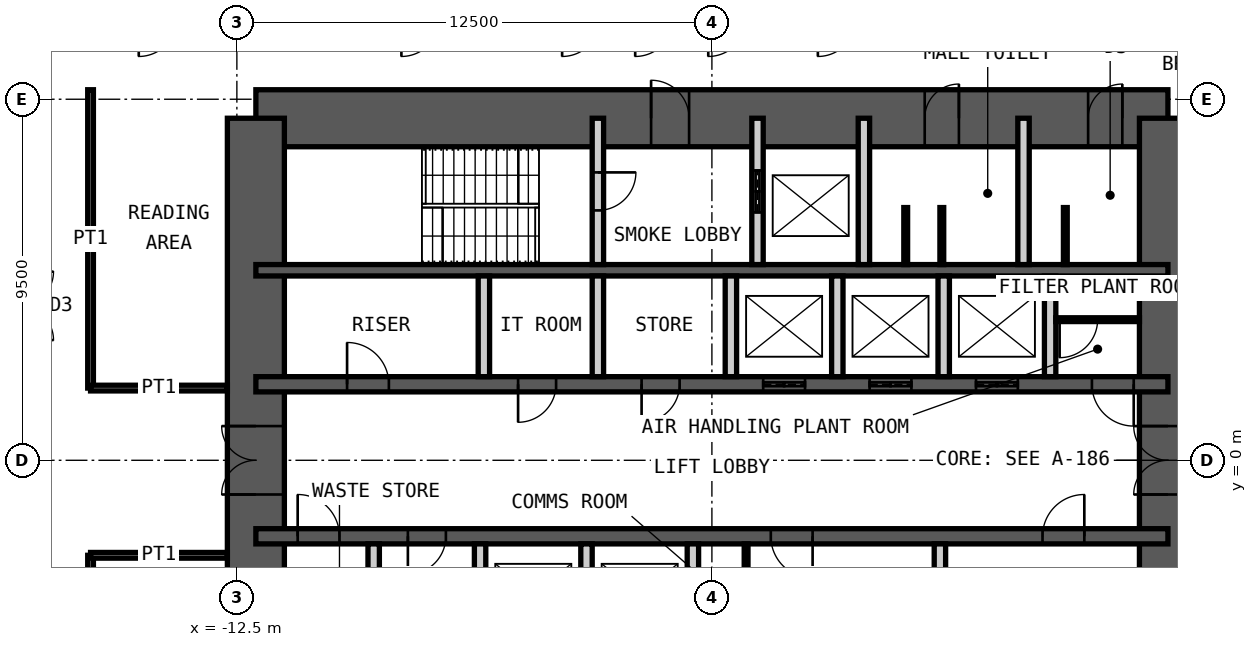
"""IFC4 building model, lengths in metres.
Left out: names, types, materials, properties, quantities, classifications, styles, units other than length and angle.
Written with IfcOpenShell. Run it as: python <this file> out.ifc"""

import sys

from ifc_helpers import new_model, si_unit, direction, frame, frame_2d, origin, place, context, subcontext, project, spatial, rectangle, extrude, element, fill, save


model = new_model("IFC4")
c1 = context("Model", 3, precision=1e-05, world=origin(), true_north=direction((0.0, 1.0)))
c2 = subcontext(c1, "Body", "Model", "MODEL_VIEW")
j1 = project(units=[si_unit("LENGTHUNIT", "METRE"), si_unit("PLANEANGLEUNIT", "RADIAN")], contexts=[c1])
p1 = place(None, origin())
s1 = spatial("IfcSite", under=j1, at=p1, CompositionType="ELEMENT")
p2 = place(p1, origin())
s2 = spatial("IfcBuilding", under=s1, at=p2, CompositionType="ELEMENT")
p3 = place(p2, frame((0.0, 0.0, 136.6)))
s3 = spatial("IfcBuildingStorey", under=s2, at=p3, CompositionType="ELEMENT", Elevation=136.6)
p4 = place(p3, frame((-12.0, 9.0, 0.0), z_axis=(0.0, 0.0, 1.0), x_axis=(1.0, 0.0, 0.0)))
e1 = element("IfcWall", 1, at=p4, inside=s3, PredefinedType="SHEAR", context=c2, shape_type="SweptSolid", body=[
    extrude(rectangle(XDim=24.0, YDim=1.5, at=frame_2d((12.0, 0.0))), origin(), (0.0, 0.0, 1.0), 4.2),
])
p5 = place(p4, frame((10.4, 0.0, 0.0)))
e2 = element("IfcOpeningElement", 2, at=p5, cuts=e1, PredefinedType="OPENING", context=c2, shape_type="SweptSolid", body=[
    extrude(rectangle(XDim=1.0, YDim=2.1, at=frame_2d((0.5, 1.05))), frame((0.0, 0.76, 0.0), z_axis=(0.0, -1.0, 0.0), x_axis=(1.0, 0.0, 0.0)), (0.0, 0.0, 1.0), 1.52),
])
p6 = place(p4, frame((17.6, 0.0, 0.0)))
e3 = element("IfcOpeningElement", 3, at=p6, cuts=e1, PredefinedType="OPENING", context=c2, shape_type="SweptSolid", body=[
    extrude(rectangle(XDim=0.9, YDim=2.1, at=frame_2d((0.45, 1.05))), frame((0.0, 0.76, 0.0), z_axis=(0.0, -1.0, 0.0), x_axis=(1.0, 0.0, 0.0)), (0.0, 0.0, 1.0), 1.52),
])
p7 = place(p4, frame((21.9, 0.0, 0.0)))
e4 = element("IfcOpeningElement", 4, at=p7, cuts=e1, PredefinedType="OPENING", context=c2, shape_type="SweptSolid", body=[
    extrude(rectangle(XDim=0.9, YDim=2.1, at=frame_2d((0.45, 1.05))), frame((0.0, 0.76, 0.0), z_axis=(0.0, -1.0, 0.0), x_axis=(1.0, 0.0, 0.0)), (0.0, 0.0, 1.0), 1.52),
])
p8 = place(p3, frame((12.0, -9.0, 0.0), z_axis=(0.0, 0.0, 1.0), x_axis=(0.0, 1.0, 0.0)))
e5 = element("IfcWall", 5, at=p8, inside=s3, PredefinedType="SHEAR", context=c2, shape_type="SweptSolid", body=[
    extrude(rectangle(XDim=18.0, YDim=1.5, at=frame_2d((9.0, 0.0))), origin(), (0.0, 0.0, 1.0), 4.2),
])
p9 = place(p8, frame((8.1, 0.0, 0.0)))
e6 = element("IfcOpeningElement", 6, at=p9, cuts=e5, PredefinedType="OPENING", context=c2, shape_type="SweptSolid", body=[
    extrude(rectangle(XDim=1.8, YDim=2.1, at=frame_2d((0.9, 1.05))), frame((0.0, 0.76, 0.0), z_axis=(0.0, -1.0, 0.0), x_axis=(1.0, 0.0, 0.0)), (0.0, 0.0, 1.0), 1.52),
])
p10 = place(p3, frame((-12.0, -9.0, 0.0), z_axis=(0.0, 0.0, 1.0), x_axis=(0.0, 1.0, 0.0)))
e7 = element("IfcWall", 7, at=p10, inside=s3, PredefinedType="SHEAR", context=c2, shape_type="SweptSolid", body=[
    extrude(rectangle(XDim=18.0, YDim=1.5, at=frame_2d((9.0, 0.0))), origin(), (0.0, 0.0, 1.0), 4.2),
])
p11 = place(p10, frame((8.1, 0.0, 0.0)))
e8 = element("IfcOpeningElement", 8, at=p11, cuts=e7, PredefinedType="OPENING", context=c2, shape_type="SweptSolid", body=[
    extrude(rectangle(XDim=1.8, YDim=2.1, at=frame_2d((0.9, 1.05))), frame((0.0, 0.76, 0.0), z_axis=(0.0, -1.0, 0.0), x_axis=(1.0, 0.0, 0.0)), (0.0, 0.0, 1.0), 1.52),
])
p12 = place(p3, frame((-12.0, 5.0, 0.0), z_axis=(0.0, 0.0, 1.0), x_axis=(1.0, 0.0, 0.0)))
e9 = element("IfcWall", 9, at=p12, inside=s3, PredefinedType="SHEAR", context=c2, shape_type="SweptSolid", body=[
    extrude(rectangle(XDim=24.0, YDim=0.3, at=frame_2d((12.0, 0.0))), origin(), (0.0, 0.0, 1.0), 4.2),
])
p13 = place(p3, frame((-12.0, 2.0, 0.0), z_axis=(0.0, 0.0, 1.0), x_axis=(1.0, 0.0, 0.0)))
e10 = element("IfcWall", 10, at=p13, inside=s3, PredefinedType="SHEAR", context=c2, shape_type="SweptSolid", body=[
    extrude(rectangle(XDim=24.0, YDim=0.4, at=frame_2d((12.0, 0.0))), origin(), (0.0, 0.0, 1.0), 4.2),
])
p14 = place(p13, frame((2.4, 0.0, 0.0)))
e11 = element("IfcOpeningElement", 11, at=p14, cuts=e10, PredefinedType="OPENING", context=c2, shape_type="SweptSolid", body=[
    extrude(rectangle(XDim=1.1, YDim=2.1, at=frame_2d((0.55, 1.05))), frame((0.0, 0.21, 0.0), z_axis=(0.0, -1.0, 0.0), x_axis=(1.0, 0.0, 0.0)), (0.0, 0.0, 1.0), 0.42),
])
p15 = place(p13, frame((22.0, 0.0, 0.0)))
e12 = element("IfcOpeningElement", 12, at=p15, cuts=e10, PredefinedType="OPENING", context=c2, shape_type="SweptSolid", body=[
    extrude(rectangle(XDim=1.1, YDim=2.1, at=frame_2d((0.55, 1.05))), frame((0.0, 0.21, 0.0), z_axis=(0.0, -1.0, 0.0), x_axis=(1.0, 0.0, 0.0)), (0.0, 0.0, 1.0), 0.42),
])
p16 = place(p13, frame((10.15, 0.0, 0.0)))
e13 = element("IfcOpeningElement", 13, at=p16, cuts=e10, PredefinedType="OPENING", context=c2, shape_type="SweptSolid", body=[
    extrude(rectangle(XDim=1.0, YDim=2.1, at=frame_2d((0.5, 1.05))), frame((0.0, 0.21, 0.0), z_axis=(0.0, -1.0, 0.0), x_axis=(1.0, 0.0, 0.0)), (0.0, 0.0, 1.0), 0.42),
])
p17 = place(p13, frame((6.9, 0.0, 0.0)))
e14 = element("IfcOpeningElement", 14, at=p17, cuts=e10, PredefinedType="OPENING", context=c2, shape_type="SweptSolid", body=[
    extrude(rectangle(XDim=1.0, YDim=2.1, at=frame_2d((0.5, 1.05))), frame((0.0, 0.21, 0.0), z_axis=(0.0, -1.0, 0.0), x_axis=(1.0, 0.0, 0.0)), (0.0, 0.0, 1.0), 0.42),
])
p18 = place(p13, frame((13.35, 0.0, 0.0)))
e15 = element("IfcOpeningElement", 15, at=p18, cuts=e10, PredefinedType="OPENING", context=c2, shape_type="SweptSolid", body=[
    extrude(rectangle(XDim=1.1, YDim=2.4, at=frame_2d((0.55, 1.2))), frame((0.0, 0.21, 0.0), z_axis=(0.0, -1.0, 0.0), x_axis=(1.0, 0.0, 0.0)), (0.0, 0.0, 1.0), 0.42),
])
p19 = place(p13, frame((16.15, 0.0, 0.0)))
e16 = element("IfcOpeningElement", 16, at=p19, cuts=e10, PredefinedType="OPENING", context=c2, shape_type="SweptSolid", body=[
    extrude(rectangle(XDim=1.1, YDim=2.4, at=frame_2d((0.55, 1.2))), frame((0.0, 0.21, 0.0), z_axis=(0.0, -1.0, 0.0), x_axis=(1.0, 0.0, 0.0)), (0.0, 0.0, 1.0), 0.42),
])
p20 = place(p13, frame((18.95, 0.0, 0.0)))
e17 = element("IfcOpeningElement", 17, at=p20, cuts=e10, PredefinedType="OPENING", context=c2, shape_type="SweptSolid", body=[
    extrude(rectangle(XDim=1.1, YDim=2.4, at=frame_2d((0.55, 1.2))), frame((0.0, 0.21, 0.0), z_axis=(0.0, -1.0, 0.0), x_axis=(1.0, 0.0, 0.0)), (0.0, 0.0, 1.0), 0.42),
])
p21 = place(p3, frame((-12.0, -2.0, 0.0), z_axis=(0.0, 0.0, 1.0), x_axis=(1.0, 0.0, 0.0)))
e18 = element("IfcWall", 18, at=p21, inside=s3, PredefinedType="SHEAR", context=c2, shape_type="SweptSolid", body=[
    extrude(rectangle(XDim=24.0, YDim=0.4, at=frame_2d((12.0, 0.0))), origin(), (0.0, 0.0, 1.0), 4.2),
])
p22 = place(p21, frame((1.1, 0.0, 0.0)))
e19 = element("IfcOpeningElement", 19, at=p22, cuts=e18, PredefinedType="OPENING", context=c2, shape_type="SweptSolid", body=[
    extrude(rectangle(XDim=1.1, YDim=2.1, at=frame_2d((0.55, 1.05))), frame((0.0, 0.21, 0.0), z_axis=(0.0, -1.0, 0.0), x_axis=(1.0, 0.0, 0.0)), (0.0, 0.0, 1.0), 0.42),
])
p23 = place(p21, frame((13.55, 0.0, 0.0)))
e20 = element("IfcOpeningElement", 20, at=p23, cuts=e18, PredefinedType="OPENING", context=c2, shape_type="SweptSolid", body=[
    extrude(rectangle(XDim=1.1, YDim=2.1, at=frame_2d((0.55, 1.05))), frame((0.0, 0.21, 0.0), z_axis=(0.0, -1.0, 0.0), x_axis=(1.0, 0.0, 0.0)), (0.0, 0.0, 1.0), 0.42),
])
p24 = place(p21, frame((20.7, 0.0, 0.0)))
e21 = element("IfcOpeningElement", 21, at=p24, cuts=e18, PredefinedType="OPENING", context=c2, shape_type="SweptSolid", body=[
    extrude(rectangle(XDim=1.1, YDim=2.1, at=frame_2d((0.55, 1.05))), frame((0.0, 0.21, 0.0), z_axis=(0.0, -1.0, 0.0), x_axis=(1.0, 0.0, 0.0)), (0.0, 0.0, 1.0), 0.42),
])
p25 = place(p21, frame((4.0, 0.0, 0.0)))
e22 = element("IfcOpeningElement", 22, at=p25, cuts=e18, PredefinedType="OPENING", context=c2, shape_type="SweptSolid", body=[
    extrude(rectangle(XDim=1.0, YDim=2.1, at=frame_2d((0.5, 1.05))), frame((0.0, 0.21, 0.0), z_axis=(0.0, -1.0, 0.0), x_axis=(1.0, 0.0, 0.0)), (0.0, 0.0, 1.0), 0.42),
])
p26 = place(p3, frame((-3.0, 5.15, 0.0), z_axis=(0.0, 0.0, 1.0), x_axis=(0.0, 1.0, 0.0)))
e23 = element("IfcWall", 23, at=p26, inside=s3, PredefinedType="PARTITIONING", context=c2, shape_type="SweptSolid", body=[
    extrude(rectangle(XDim=3.85, YDim=0.3, at=frame_2d((1.925, 0.0))), origin(), (0.0, 0.0, 1.0), 3.98),
])
p27 = place(p26, frame((1.425, 0.0, 0.0)))
e24 = element("IfcOpeningElement", 24, at=p27, cuts=e23, PredefinedType="OPENING", context=c2, shape_type="SweptSolid", body=[
    extrude(rectangle(XDim=1.0, YDim=2.1, at=frame_2d((0.5, 1.05))), frame((0.0, 0.16, 0.0), z_axis=(0.0, -1.0, 0.0), x_axis=(1.0, 0.0, 0.0)), (0.0, 0.0, 1.0), 0.32),
])
p28 = place(p3, frame((1.2, 5.15, 0.0), z_axis=(0.0, 0.0, 1.0), x_axis=(0.0, 1.0, 0.0)))
e25 = element("IfcWall", 25, at=p28, inside=s3, PredefinedType="PARTITIONING", context=c2, shape_type="SweptSolid", body=[
    extrude(rectangle(XDim=3.85, YDim=0.3, at=frame_2d((1.925, 0.0))), origin(), (0.0, 0.0, 1.0), 3.98),
])
p29 = place(p28, frame((1.375, 0.0, 0.0)))
e26 = element("IfcOpeningElement", 26, at=p29, cuts=e25, PredefinedType="OPENING", context=c2, shape_type="SweptSolid", body=[
    extrude(rectangle(XDim=1.1, YDim=2.4, at=frame_2d((0.55, 1.2))), frame((0.0, 0.16, 0.0), z_axis=(0.0, -1.0, 0.0), x_axis=(1.0, 0.0, 0.0)), (0.0, 0.0, 1.0), 0.32),
])
for number, where, z_axis, x_axis in (
    (27, (4.0, 5.15, 0.0), (0.0, 0.0, 1.0), (0.0, 1.0, 0.0)),
    (28, (8.2, 5.15, 0.0), (0.0, 0.0, 1.0), (0.0, 1.0, 0.0)),
):
    element("IfcWall", number, at=place(p3, frame(where, z_axis=z_axis, x_axis=x_axis)), inside=s3, PredefinedType="PARTITIONING", context=c2, shape_type="SweptSolid", body=[
        extrude(rectangle(XDim=3.85, YDim=0.3, at=frame_2d((1.925, 0.0))), origin(), (0.0, 0.0, 1.0), 3.98),
    ])
for number, where, z_axis, x_axis in (
    (29, (-6.0, 2.2, 0.0), (0.0, 0.0, 1.0), (0.0, 1.0, 0.0)),
    (30, (-3.0, 2.2, 0.0), (0.0, 0.0, 1.0), (0.0, 1.0, 0.0)),
    (31, (0.5, 2.2, 0.0), (0.0, 0.0, 1.0), (0.0, 1.0, 0.0)),
    (32, (3.3, 2.2, 0.0), (0.0, 0.0, 1.0), (0.0, 1.0, 0.0)),
    (33, (6.1, 2.2, 0.0), (0.0, 0.0, 1.0), (0.0, 1.0, 0.0)),
    (34, (8.9, 2.2, 0.0), (0.0, 0.0, 1.0), (0.0, 1.0, 0.0)),
    (35, (-8.9, -4.85, 0.0), (0.0, 0.0, 1.0), (0.0, 1.0, 0.0)),
    (36, (-6.1, -4.85, 0.0), (0.0, 0.0, 1.0), (0.0, 1.0, 0.0)),
    (37, (-3.3, -4.85, 0.0), (0.0, 0.0, 1.0), (0.0, 1.0, 0.0)),
    (38, (-0.5, -4.85, 0.0), (0.0, 0.0, 1.0), (0.0, 1.0, 0.0)),
    (39, (6.0, -4.85, 0.0), (0.0, 0.0, 1.0), (0.0, 1.0, 0.0)),
):
    element("IfcWall", number, at=place(p3, frame(where, z_axis=z_axis, x_axis=x_axis)), inside=s3, PredefinedType="PARTITIONING", context=c2, shape_type="SweptSolid", body=[
        extrude(rectangle(XDim=2.65, YDim=0.3, at=frame_2d((1.325, 0.0))), origin(), (0.0, 0.0, 1.0), 3.98),
    ])
p30 = place(p3, frame((0.9, -4.85, 0.0), z_axis=(0.0, 0.0, 1.0), x_axis=(0.0, 1.0, 0.0)))
e40 = element("IfcWall", 40, at=p30, inside=s3, PredefinedType="PARTITIONING", context=c2, shape_type="SweptSolid", body=[
    extrude(rectangle(XDim=2.65, YDim=0.1, at=frame_2d((1.325, 0.0))), origin(), (0.0, 0.0, 1.0), 3.98),
])
p31 = place(p30, frame((0.1, 0.0, 0.0)))
e41 = element("IfcOpeningElement", 41, at=p31, cuts=e40, PredefinedType="OPENING", context=c2, shape_type="SweptSolid", body=[
    extrude(rectangle(XDim=1.0, YDim=2.4, at=frame_2d((0.5, 1.2))), frame((0.0, 0.06, 0.0), z_axis=(0.0, -1.0, 0.0), x_axis=(1.0, 0.0, 0.0)), (0.0, 0.0, 1.0), 0.12),
])
p32 = place(p3, frame((9.05, 3.7, 0.0), z_axis=(0.0, 0.0, 1.0), x_axis=(1.0, 0.0, 0.0)))
e42 = element("IfcWall", 42, at=p32, inside=s3, PredefinedType="PARTITIONING", context=c2, shape_type="SweptSolid", body=[
    extrude(rectangle(XDim=2.2, YDim=0.1, at=frame_2d((1.1, 0.0))), origin(), (0.0, 0.0, 1.0), 3.98),
])
p33 = place(p32, frame((0.1, 0.0, 0.0)))
e43 = element("IfcOpeningElement", 43, at=p33, cuts=e42, PredefinedType="OPENING", context=c2, shape_type="SweptSolid", body=[
    extrude(rectangle(XDim=1.0, YDim=2.4, at=frame_2d((0.5, 1.2))), frame((0.0, 0.06, 0.0), z_axis=(0.0, -1.0, 0.0), x_axis=(1.0, 0.0, 0.0)), (0.0, 0.0, 1.0), 0.12),
])
for number, where, z_axis, x_axis in (
    (44, (5.1, 5.15, 0.0), (0.0, 0.0, 1.0), (0.0, 1.0, 0.0)),
    (45, (6.05, 5.15, 0.0), (0.0, 0.0, 1.0), (0.0, 1.0, 0.0)),
    (46, (9.3, 5.15, 0.0), (0.0, 0.0, 1.0), (0.0, 1.0, 0.0)),
):
    element("IfcWall", number, at=place(p3, frame(where, z_axis=z_axis, x_axis=x_axis)), inside=s3, PredefinedType="PARTITIONING", context=c2, shape_type="SweptSolid", body=[
        extrude(rectangle(XDim=1.5, YDim=0.1, at=frame_2d((0.75, 0.0))), origin(), (0.0, 0.0, 1.0), 2.1),
    ])
p34 = place(p3, frame((-16.35, 1.9, 0.0), z_axis=(0.0, 0.0, 1.0), x_axis=(0.0, 1.0, 0.0)))
e47 = element("IfcWall", 47, at=p34, inside=s3, PredefinedType="PARTITIONING", context=c2, shape_type="SweptSolid", body=[
    extrude(rectangle(XDim=7.85, YDim=0.15, at=frame_2d((3.925, 0.0))), origin(), (0.0, 0.0, 1.0), 4.03),
])
p35 = place(p3, frame((-12.75, 1.9, 0.0), z_axis=(0.0, 0.0, 1.0), x_axis=(-1.0, 0.0, 0.0)))
e48 = element("IfcWall", 48, at=p35, inside=s3, PredefinedType="PARTITIONING", context=c2, shape_type="SweptSolid", body=[
    extrude(rectangle(XDim=3.6, YDim=0.15, at=frame_2d((1.8, 0.0))), origin(), (0.0, 0.0, 1.0), 3.33),
])
p36 = place(p3, frame((-16.35, -9.75, 0.0), z_axis=(0.0, 0.0, 1.0), x_axis=(0.0, 1.0, 0.0)))
e49 = element("IfcWall", 49, at=p36, inside=s3, PredefinedType="PARTITIONING", context=c2, shape_type="SweptSolid", body=[
    extrude(rectangle(XDim=7.25, YDim=0.15, at=frame_2d((3.625, 0.0))), origin(), (0.0, 0.0, 1.0), 4.03),
])
p37 = place(p3, frame((-12.75, -2.5, 0.0), z_axis=(0.0, 0.0, 1.0), x_axis=(-1.0, 0.0, 0.0)))
e50 = element("IfcWall", 50, at=p37, inside=s3, PredefinedType="PARTITIONING", context=c2, shape_type="SweptSolid", body=[
    extrude(rectangle(XDim=3.6, YDim=0.15, at=frame_2d((1.8, 0.0))), origin(), (0.0, 0.0, 1.0), 3.33),
])
p38 = place(p5, origin())
e51 = element("IfcDoor", 51, at=p38, inside=s3, OperationType="SINGLE_SWING_RIGHT", PredefinedType="DOOR", context=c2, shape_type="SweptSolid", body=[
    extrude(rectangle(XDim=1.0, YDim=2.1, at=frame_2d((0.5, 1.05))), frame((0.0, 0.025, 0.0), z_axis=(0.0, -1.0, 0.0), x_axis=(1.0, 0.0, 0.0)), (0.0, 0.0, 1.0), 0.05),
])
fill(e2, e51)
p39 = place(p6, origin())
e52 = element("IfcDoor", 52, at=p39, inside=s3, OperationType="SINGLE_SWING_LEFT", PredefinedType="DOOR", context=c2, shape_type="SweptSolid", body=[
    extrude(rectangle(XDim=0.9, YDim=2.1, at=frame_2d((0.45, 1.05))), frame((0.0, 0.025, 0.0), z_axis=(0.0, -1.0, 0.0), x_axis=(1.0, 0.0, 0.0)), (0.0, 0.0, 1.0), 0.05),
])
fill(e3, e52)
p40 = place(p7, origin())
e53 = element("IfcDoor", 53, at=p40, inside=s3, OperationType="SINGLE_SWING_LEFT", PredefinedType="DOOR", context=c2, shape_type="SweptSolid", body=[
    extrude(rectangle(XDim=0.9, YDim=2.1, at=frame_2d((0.45, 1.05))), frame((0.0, 0.025, 0.0), z_axis=(0.0, -1.0, 0.0), x_axis=(1.0, 0.0, 0.0)), (0.0, 0.0, 1.0), 0.05),
])
fill(e4, e53)
p41 = place(p27, origin())
e54 = element("IfcDoor", 54, at=p41, inside=s3, OperationType="SINGLE_SWING_RIGHT", PredefinedType="DOOR", context=c2, shape_type="SweptSolid", body=[
    extrude(rectangle(XDim=1.0, YDim=2.1, at=frame_2d((0.5, 1.05))), frame((0.0, 0.025, 0.0), z_axis=(0.0, -1.0, 0.0), x_axis=(1.0, 0.0, 0.0)), (0.0, 0.0, 1.0), 0.05),
])
fill(e24, e54)
p42 = place(p14, origin())
e55 = element("IfcDoor", 55, at=p42, inside=s3, OperationType="SINGLE_SWING_RIGHT", PredefinedType="DOOR", context=c2, shape_type="SweptSolid", body=[
    extrude(rectangle(XDim=1.1, YDim=2.1, at=frame_2d((0.55, 1.05))), frame((0.0, 0.025, 0.0), z_axis=(0.0, -1.0, 0.0), x_axis=(1.0, 0.0, 0.0)), (0.0, 0.0, 1.0), 0.05),
])
fill(e11, e55)
p43 = place(p22, origin())
e56 = element("IfcDoor", 56, at=p43, inside=s3, OperationType="SINGLE_SWING_RIGHT", PredefinedType="DOOR", context=c2, shape_type="SweptSolid", body=[
    extrude(rectangle(XDim=1.1, YDim=2.1, at=frame_2d((0.55, 1.05))), frame((0.0, 0.025, 0.0), z_axis=(0.0, -1.0, 0.0), x_axis=(1.0, 0.0, 0.0)), (0.0, 0.0, 1.0), 0.05),
])
fill(e19, e56)
p44 = place(p15, origin())
e57 = element("IfcDoor", 57, at=p44, inside=s3, OperationType="SINGLE_SWING_RIGHT", PredefinedType="DOOR", context=c2, shape_type="SweptSolid", body=[
    extrude(rectangle(XDim=1.1, YDim=2.1, at=frame_2d((0.55, 1.05))), frame((0.0, 0.025, 0.0), z_axis=(0.0, -1.0, 0.0), x_axis=(1.0, 0.0, 0.0)), (0.0, 0.0, 1.0), 0.05),
])
fill(e12, e57)
p45 = place(p16, origin())
e58 = element("IfcDoor", 58, at=p45, inside=s3, OperationType="SINGLE_SWING_LEFT", PredefinedType="DOOR", context=c2, shape_type="SweptSolid", body=[
    extrude(rectangle(XDim=1.0, YDim=2.1, at=frame_2d((0.5, 1.05))), frame((0.0, 0.025, 0.0), z_axis=(0.0, -1.0, 0.0), x_axis=(1.0, 0.0, 0.0)), (0.0, 0.0, 1.0), 0.05),
])
fill(e13, e58)
p46 = place(p23, origin())
e59 = element("IfcDoor", 59, at=p46, inside=s3, OperationType="SINGLE_SWING_RIGHT", PredefinedType="DOOR", context=c2, shape_type="SweptSolid", body=[
    extrude(rectangle(XDim=1.1, YDim=2.1, at=frame_2d((0.55, 1.05))), frame((0.0, 0.025, 0.0), z_axis=(0.0, -1.0, 0.0), x_axis=(1.0, 0.0, 0.0)), (0.0, 0.0, 1.0), 0.05),
])
fill(e20, e59)
p47 = place(p24, origin())
e60 = element("IfcDoor", 60, at=p47, inside=s3, OperationType="SINGLE_SWING_LEFT", PredefinedType="DOOR", context=c2, shape_type="SweptSolid", body=[
    extrude(rectangle(XDim=1.1, YDim=2.1, at=frame_2d((0.55, 1.05))), frame((0.0, 0.025, 0.0), z_axis=(0.0, -1.0, 0.0), x_axis=(1.0, 0.0, 0.0)), (0.0, 0.0, 1.0), 0.05),
])
fill(e21, e60)
p48 = place(p9, origin())
e61 = element("IfcDoor", 61, at=p48, inside=s3, OperationType="DOUBLE_DOOR_DOUBLE_SWING", PredefinedType="DOOR", context=c2, shape_type="SweptSolid", body=[
    extrude(rectangle(XDim=1.8, YDim=2.1, at=frame_2d((0.9, 1.05))), frame((0.0, 0.025, 0.0), z_axis=(0.0, -1.0, 0.0), x_axis=(1.0, 0.0, 0.0)), (0.0, 0.0, 1.0), 0.05),
])
fill(e6, e61)
p49 = place(p11, origin())
e62 = element("IfcDoor", 62, at=p49, inside=s3, OperationType="DOUBLE_DOOR_DOUBLE_SWING", PredefinedType="DOOR", context=c2, shape_type="SweptSolid", body=[
    extrude(rectangle(XDim=1.8, YDim=2.1, at=frame_2d((0.9, 1.05))), frame((0.0, 0.025, 0.0), z_axis=(0.0, -1.0, 0.0), x_axis=(1.0, 0.0, 0.0)), (0.0, 0.0, 1.0), 0.05),
])
fill(e8, e62)
p50 = place(p29, origin())
e63 = element("IfcDoor", 63, at=p50, inside=s3, OperationType="DOUBLE_DOOR_SLIDING", PredefinedType="DOOR", context=c2, shape_type="SweptSolid", body=[
    extrude(rectangle(XDim=1.1, YDim=2.4, at=frame_2d((0.55, 1.2))), frame((0.0, 0.025, 0.0), z_axis=(0.0, -1.0, 0.0), x_axis=(1.0, 0.0, 0.0)), (0.0, 0.0, 1.0), 0.05),
])
fill(e26, e63)
p51 = place(p17, origin())
e64 = element("IfcDoor", 64, at=p51, inside=s3, OperationType="SINGLE_SWING_LEFT", PredefinedType="DOOR", context=c2, shape_type="SweptSolid", body=[
    extrude(rectangle(XDim=1.0, YDim=2.1, at=frame_2d((0.5, 1.05))), frame((0.0, 0.025, 0.0), z_axis=(0.0, -1.0, 0.0), x_axis=(1.0, 0.0, 0.0)), (0.0, 0.0, 1.0), 0.05),
])
fill(e14, e64)
p52 = place(p18, origin())
e65 = element("IfcDoor", 65, at=p52, inside=s3, OperationType="DOUBLE_DOOR_SLIDING", PredefinedType="DOOR", context=c2, shape_type="SweptSolid", body=[
    extrude(rectangle(XDim=1.1, YDim=2.4, at=frame_2d((0.55, 1.2))), frame((0.0, 0.025, 0.0), z_axis=(0.0, -1.0, 0.0), x_axis=(1.0, 0.0, 0.0)), (0.0, 0.0, 1.0), 0.05),
])
fill(e15, e65)
p53 = place(p19, origin())
e66 = element("IfcDoor", 66, at=p53, inside=s3, OperationType="DOUBLE_DOOR_SLIDING", PredefinedType="DOOR", context=c2, shape_type="SweptSolid", body=[
    extrude(rectangle(XDim=1.1, YDim=2.4, at=frame_2d((0.55, 1.2))), frame((0.0, 0.025, 0.0), z_axis=(0.0, -1.0, 0.0), x_axis=(1.0, 0.0, 0.0)), (0.0, 0.0, 1.0), 0.05),
])
fill(e16, e66)
p54 = place(p20, origin())
e67 = element("IfcDoor", 67, at=p54, inside=s3, OperationType="DOUBLE_DOOR_SLIDING", PredefinedType="DOOR", context=c2, shape_type="SweptSolid", body=[
    extrude(rectangle(XDim=1.1, YDim=2.4, at=frame_2d((0.55, 1.2))), frame((0.0, 0.025, 0.0), z_axis=(0.0, -1.0, 0.0), x_axis=(1.0, 0.0, 0.0)), (0.0, 0.0, 1.0), 0.05),
])
fill(e17, e67)
p55 = place(p25, origin())
e68 = element("IfcDoor", 68, at=p55, inside=s3, OperationType="SINGLE_SWING_LEFT", PredefinedType="DOOR", context=c2, shape_type="SweptSolid", body=[
    extrude(rectangle(XDim=1.0, YDim=2.1, at=frame_2d((0.5, 1.05))), frame((0.0, 0.025, 0.0), z_axis=(0.0, -1.0, 0.0), x_axis=(1.0, 0.0, 0.0)), (0.0, 0.0, 1.0), 0.05),
])
fill(e22, e68)
p56 = place(p33, origin())
e69 = element("IfcDoor", 69, at=p56, inside=s3, OperationType="SINGLE_SWING_LEFT", PredefinedType="DOOR", context=c2, shape_type="SweptSolid", body=[
    extrude(rectangle(XDim=1.0, YDim=2.4, at=frame_2d((0.5, 1.2))), frame((0.0, 0.025, 0.0), z_axis=(0.0, -1.0, 0.0), x_axis=(1.0, 0.0, 0.0)), (0.0, 0.0, 1.0), 0.05),
])
fill(e43, e69)
save(model, sys.argv[1])
